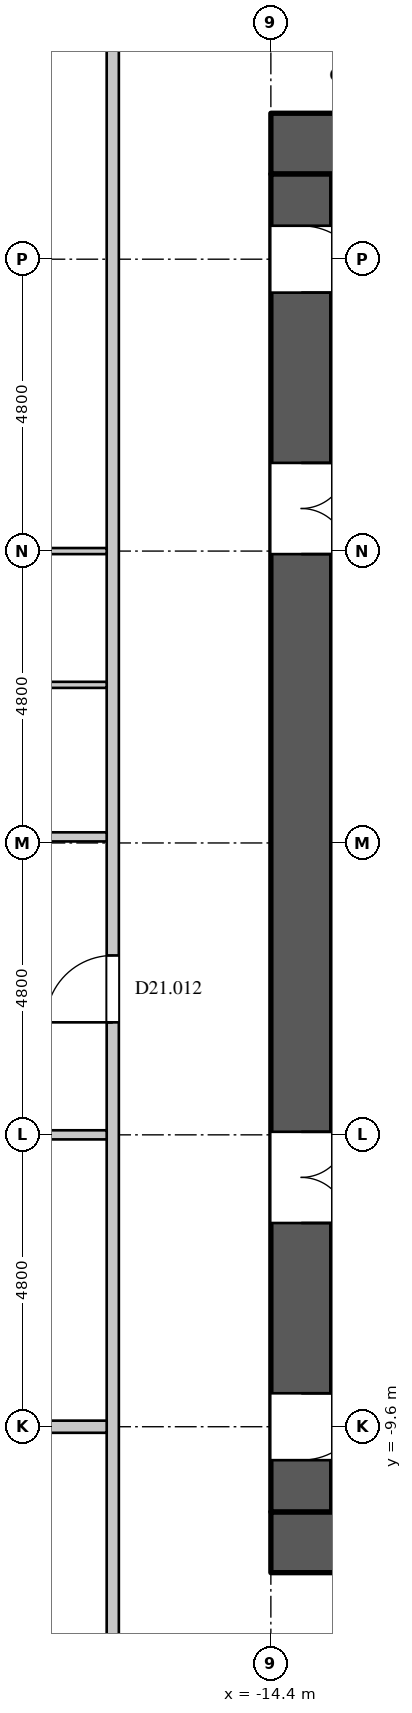
"""IFC4 building model, lengths in metres.
Left out: names, types, materials, properties, quantities, classifications, styles, units other than length and angle.
Written with IfcOpenShell. Run it as: python <this file> out.ifc"""

import sys

from ifc_helpers import new_model, si_unit, direction, frame, frame_2d, origin, place, context, subcontext, project, spatial, rectangle, extrude, element, fill, save


model = new_model("IFC4")
c1 = context("Model", 3, precision=1e-05, world=origin(), true_north=direction((0.0, 1.0)))
c2 = subcontext(c1, "Body", "Model", "MODEL_VIEW")
j1 = project(units=[si_unit("LENGTHUNIT", "METRE"), si_unit("PLANEANGLEUNIT", "RADIAN")], contexts=[c1])
p1 = place(None, origin())
s1 = spatial("IfcSite", under=j1, at=p1, CompositionType="ELEMENT")
p2 = place(p1, origin())
s2 = spatial("IfcBuilding", under=s1, at=p2, CompositionType="ELEMENT")
p3 = place(p2, frame((0.0, 0.0, 92.7)))
s3 = spatial("IfcBuildingStorey", under=s2, at=p3, CompositionType="ELEMENT", Elevation=92.7)
for number, where, z_axis, x_axis in (
    (1, (-14.4, 11.5, 0.0), (0.0, 0.0, 1.0), (1.0, 0.0, 0.0)),
    (2, (-14.4, -11.5, 0.0), (0.0, 0.0, 1.0), (1.0, 0.0, 0.0)),
):
    element("IfcWall", number, at=place(p3, frame(where, z_axis=z_axis, x_axis=x_axis)), inside=s3, PredefinedType="SHEAR", context=c2, shape_type="SweptSolid", body=[
        extrude(rectangle(XDim=28.8, YDim=1.0, at=frame_2d((14.4, 0.0))), origin(), (0.0, 0.0, 1.0), 4.2),
    ])
p4 = place(p3, frame((-13.9, -11.0, 0.0), z_axis=(0.0, 0.0, 1.0), x_axis=(0.0, 1.0, 0.0)))
e3 = element("IfcWall", 3, at=p4, inside=s3, PredefinedType="SHEAR", context=c2, shape_type="SweptSolid", body=[
    extrude(rectangle(XDim=22.0, YDim=1.0, at=frame_2d((11.0, 0.0))), origin(), (0.0, 0.0, 1.0), 4.2),
])
p5 = place(p4, frame((20.05, 0.0, 0.0)))
e4 = element("IfcOpeningElement", 4, at=p5, cuts=e3, PredefinedType="OPENING", context=c2, shape_type="SweptSolid", body=[
    extrude(rectangle(XDim=1.1, YDim=2.2, at=frame_2d((0.55, 1.1))), frame((0.0, 0.51, 0.0), z_axis=(0.0, -1.0, 0.0), x_axis=(1.0, 0.0, 0.0)), (0.0, 0.0, 1.0), 1.02),
])
p6 = place(p4, frame((0.85, 0.0, 0.0)))
e5 = element("IfcOpeningElement", 5, at=p6, cuts=e3, PredefinedType="OPENING", context=c2, shape_type="SweptSolid", body=[
    extrude(rectangle(XDim=1.1, YDim=2.2, at=frame_2d((0.55, 1.1))), frame((0.0, 0.51, 0.0), z_axis=(0.0, -1.0, 0.0), x_axis=(1.0, 0.0, 0.0)), (0.0, 0.0, 1.0), 1.02),
])
p7 = place(p4, frame((15.75, 0.0, 0.0)))
e6 = element("IfcOpeningElement", 6, at=p7, cuts=e3, PredefinedType="OPENING", context=c2, shape_type="SweptSolid", body=[
    extrude(rectangle(XDim=1.5, YDim=2.4, at=frame_2d((0.75, 1.2))), frame((0.0, 0.51, 0.0), z_axis=(0.0, -1.0, 0.0), x_axis=(1.0, 0.0, 0.0)), (0.0, 0.0, 1.0), 1.02),
])
p8 = place(p4, frame((4.75, 0.0, 0.0)))
e7 = element("IfcOpeningElement", 7, at=p8, cuts=e3, PredefinedType="OPENING", context=c2, shape_type="SweptSolid", body=[
    extrude(rectangle(XDim=1.5, YDim=2.4, at=frame_2d((0.75, 1.2))), frame((0.0, 0.51, 0.0), z_axis=(0.0, -1.0, 0.0), x_axis=(1.0, 0.0, 0.0)), (0.0, 0.0, 1.0), 1.02),
])
p9 = place(p3, frame((-17.0, -14.5, 0.0), z_axis=(0.0, 0.0, 1.0), x_axis=(0.0, 1.0, 0.0)))
e8 = element("IfcWall", 8, at=p9, inside=s3, PredefinedType="PARTITIONING", context=c2, shape_type="SweptSolid", body=[
    extrude(rectangle(XDim=29.0, YDim=0.2, at=frame_2d((14.5, 0.0))), origin(), (0.0, 0.0, 1.0), 3.798),
])
p10 = place(p9, frame((11.55, 0.0, 0.0)))
e9 = element("IfcOpeningElement", 9, at=p10, cuts=e8, PredefinedType="OPENING", context=c2, shape_type="SweptSolid", body=[
    extrude(rectangle(XDim=1.1, YDim=2.4, at=frame_2d((0.55, 1.2))), frame((0.0, 0.11, 0.0), z_axis=(0.0, -1.0, 0.0), x_axis=(1.0, 0.0, 0.0)), (0.0, 0.0, 1.0), 0.22),
])
p11 = place(p3, frame((-27.9, -4.8, 0.0), z_axis=(0.0, 0.0, 1.0), x_axis=(1.0, 0.0, 0.0)))
e10 = element("IfcWall", 10, at=p11, inside=s3, PredefinedType="PARTITIONING", context=c2, shape_type="SweptSolid", body=[
    extrude(rectangle(XDim=10.8, YDim=0.15, at=frame_2d((5.4, 0.0))), origin(), (0.0, 0.0, 1.0), 3.1),
])
p12 = place(p11, frame((8.0, 0.0, 0.0)))
e11 = element("IfcOpeningElement", 11, at=p12, cuts=e10, PredefinedType="OPENING", context=c2, shape_type="SweptSolid", body=[
    extrude(rectangle(XDim=0.95, YDim=2.2, at=frame_2d((0.475, 1.1))), frame((0.0, 0.085, 0.0), z_axis=(0.0, -1.0, 0.0), x_axis=(1.0, 0.0, 0.0)), (0.0, 0.0, 1.0), 0.17),
])
p13 = place(p11, frame((1.6, 0.0, 0.0)))
e12 = element("IfcOpeningElement", 12, at=p13, cuts=e10, PredefinedType="OPENING", context=c2, shape_type="SweptSolid", body=[
    extrude(rectangle(XDim=0.95, YDim=2.2, at=frame_2d((0.475, 1.1))), frame((0.0, 0.085, 0.0), z_axis=(0.0, -1.0, 0.0), x_axis=(1.0, 0.0, 0.0)), (0.0, 0.0, 1.0), 0.17),
])
p14 = place(p3, frame((-22.947, -12.051, 0.0), z_axis=(0.0, 0.0, 1.0), x_axis=(0.707106781187, -0.707106781187, 0.0)))
e13 = element("IfcWall", 13, at=p14, inside=s3, PredefinedType="PARTITIONING", context=c2, shape_type="SweptSolid", body=[
    extrude(rectangle(XDim=7.63, YDim=0.15, at=frame_2d((3.815, 0.0))), origin(), (0.0, 0.0, 1.0), 3.798),
])
p15 = place(p14, frame((4.65, 0.0, 0.0)))
e14 = element("IfcOpeningElement", 14, at=p15, cuts=e13, PredefinedType="OPENING", context=c2, shape_type="SweptSolid", body=[
    extrude(rectangle(XDim=0.95, YDim=2.2, at=frame_2d((0.475, 1.1))), frame((0.0, 0.085, 0.0), z_axis=(0.0, -1.0, 0.0), x_axis=(1.0, 0.0, 0.0)), (0.0, 0.0, 1.0), 0.17),
])
p16 = place(p3, frame((-22.747, 11.968, 0.0), z_axis=(0.0, 0.0, 1.0), x_axis=(0.707106781187, 0.707106781187, 0.0)))
e15 = element("IfcWall", 15, at=p16, inside=s3, PredefinedType="PARTITIONING", context=c2, shape_type="SweptSolid", body=[
    extrude(rectangle(XDim=9.913, YDim=0.15, at=frame_2d((4.957, 0.0))), origin(), (0.0, 0.0, 1.0), 3.798),
])
p17 = place(p16, frame((4.45, 0.0, 0.0)))
e16 = element("IfcOpeningElement", 16, at=p17, cuts=e15, PredefinedType="OPENING", context=c2, shape_type="SweptSolid", body=[
    extrude(rectangle(XDim=0.95, YDim=2.2, at=frame_2d((0.475, 1.1))), frame((0.0, 0.085, 0.0), z_axis=(0.0, -1.0, 0.0), x_axis=(1.0, 0.0, 0.0)), (0.0, 0.0, 1.0), 0.17),
])
p18 = place(p16, frame((8.35, 0.0, 0.0)))
e17 = element("IfcOpeningElement", 17, at=p18, cuts=e15, PredefinedType="OPENING", context=c2, shape_type="SweptSolid", body=[
    extrude(rectangle(XDim=0.95, YDim=2.2, at=frame_2d((0.475, 1.1))), frame((0.0, 0.085, 0.0), z_axis=(0.0, -1.0, 0.0), x_axis=(1.0, 0.0, 0.0)), (0.0, 0.0, 1.0), 0.17),
])
p19 = place(p3, frame((-21.725, 0.1, 0.0), z_axis=(0.0, 0.0, 1.0), x_axis=(1.0, 0.0, 0.0)))
e18 = element("IfcWall", 18, at=p19, inside=s3, PredefinedType="PARTITIONING", context=c2, shape_type="SweptSolid", body=[
    extrude(rectangle(XDim=4.625, YDim=0.15, at=frame_2d((2.312, 0.0))), origin(), (0.0, 0.0, 1.0), 3.798),
])
p20 = place(p19, frame((1.85, 0.0, 0.0)))
e19 = element("IfcOpeningElement", 19, at=p20, cuts=e18, PredefinedType="OPENING", context=c2, shape_type="SweptSolid", body=[
    extrude(rectangle(XDim=0.95, YDim=2.2, at=frame_2d((0.475, 1.1))), frame((0.0, 0.085, 0.0), z_axis=(0.0, -1.0, 0.0), x_axis=(1.0, 0.0, 0.0)), (0.0, 0.0, 1.0), 0.17),
])
p21 = place(p3, frame((-28.855, -9.6, 0.0), z_axis=(0.0, 0.0, 1.0), x_axis=(1.0, 0.0, 0.0)))
e20 = element("IfcWall", 20, at=p21, inside=s3, PredefinedType="PARTITIONING", context=c2, shape_type="SweptSolid", body=[
    extrude(rectangle(XDim=11.755, YDim=0.2, at=frame_2d((5.877, 0.0))), origin(), (0.0, 0.0, 1.0), 3.798),
])
p22 = place(p3, frame((-21.78, 4.8, 0.0), z_axis=(0.0, 0.0, 1.0), x_axis=(1.0, 0.0, 0.0)))
e21 = element("IfcWall", 21, at=p22, inside=s3, PredefinedType="PARTITIONING", context=c2, shape_type="SweptSolid", body=[
    extrude(rectangle(XDim=4.68, YDim=0.1, at=frame_2d((2.34, 0.0))), origin(), (0.0, 0.0, 1.0), 3.1),
])
p23 = place(p22, frame((1.95, 0.0, 0.0)))
e22 = element("IfcOpeningElement", 22, at=p23, cuts=e21, PredefinedType="OPENING", context=c2, shape_type="SweptSolid", body=[
    extrude(rectangle(XDim=0.9, YDim=2.2, at=frame_2d((0.45, 1.1))), frame((0.0, 0.06, 0.0), z_axis=(0.0, -1.0, 0.0), x_axis=(1.0, 0.0, 0.0)), (0.0, 0.0, 1.0), 0.12),
])
p24 = place(p3, frame((-21.725, 2.6, 0.0), z_axis=(0.0, 0.0, 1.0), x_axis=(1.0, 0.0, 0.0)))
e23 = element("IfcWall", 23, at=p24, inside=s3, PredefinedType="PARTITIONING", context=c2, shape_type="SweptSolid", body=[
    extrude(rectangle(XDim=4.625, YDim=0.1, at=frame_2d((2.312, 0.0))), origin(), (0.0, 0.0, 1.0), 3.798),
])
p25 = place(p5, origin())
e24 = element("IfcDoor", 24, at=p25, inside=s3, OperationType="SINGLE_SWING_RIGHT", PredefinedType="DOOR", context=c2, shape_type="SweptSolid", body=[
    extrude(rectangle(XDim=1.1, YDim=2.2, at=frame_2d((0.55, 1.1))), frame((0.0, -0.445, 0.0), z_axis=(0.0, -1.0, 0.0), x_axis=(1.0, 0.0, 0.0)), (0.0, 0.0, 1.0), 0.05),
])
fill(e4, e24)
p26 = place(p6, origin())
e25 = element("IfcDoor", 25, at=p26, inside=s3, OperationType="SINGLE_SWING_LEFT", PredefinedType="DOOR", context=c2, shape_type="SweptSolid", body=[
    extrude(rectangle(XDim=1.1, YDim=2.2, at=frame_2d((0.55, 1.1))), frame((0.0, -0.445, 0.0), z_axis=(0.0, -1.0, 0.0), x_axis=(1.0, 0.0, 0.0)), (0.0, 0.0, 1.0), 0.05),
])
fill(e5, e25)
p27 = place(p7, origin())
e26 = element("IfcDoor", 26, at=p27, inside=s3, OperationType="DOUBLE_DOOR_SINGLE_SWING", PredefinedType="DOOR", context=c2, shape_type="SweptSolid", body=[
    extrude(rectangle(XDim=1.5, YDim=2.4, at=frame_2d((0.75, 1.2))), frame((0.0, -0.445, 0.0), z_axis=(0.0, -1.0, 0.0), x_axis=(1.0, 0.0, 0.0)), (0.0, 0.0, 1.0), 0.05),
])
fill(e6, e26)
p28 = place(p8, origin())
e27 = element("IfcDoor", 27, at=p28, inside=s3, OperationType="DOUBLE_DOOR_SINGLE_SWING", PredefinedType="DOOR", context=c2, shape_type="SweptSolid", body=[
    extrude(rectangle(XDim=1.5, YDim=2.4, at=frame_2d((0.75, 1.2))), frame((0.0, -0.445, 0.0), z_axis=(0.0, -1.0, 0.0), x_axis=(1.0, 0.0, 0.0)), (0.0, 0.0, 1.0), 0.05),
])
fill(e7, e27)
p29 = place(p10, origin())
e28 = element("IfcDoor", 28, at=p29, inside=s3, OperationType="SINGLE_SWING_LEFT", PredefinedType="DOOR", context=c2, shape_type="SweptSolid", body=[
    extrude(rectangle(XDim=1.1, YDim=2.4, at=frame_2d((0.55, 1.2))), frame((0.0, 0.025, 0.0), z_axis=(0.0, -1.0, 0.0), x_axis=(1.0, 0.0, 0.0)), (0.0, 0.0, 1.0), 0.05),
])
fill(e9, e28)
save(model, sys.argv[1])
